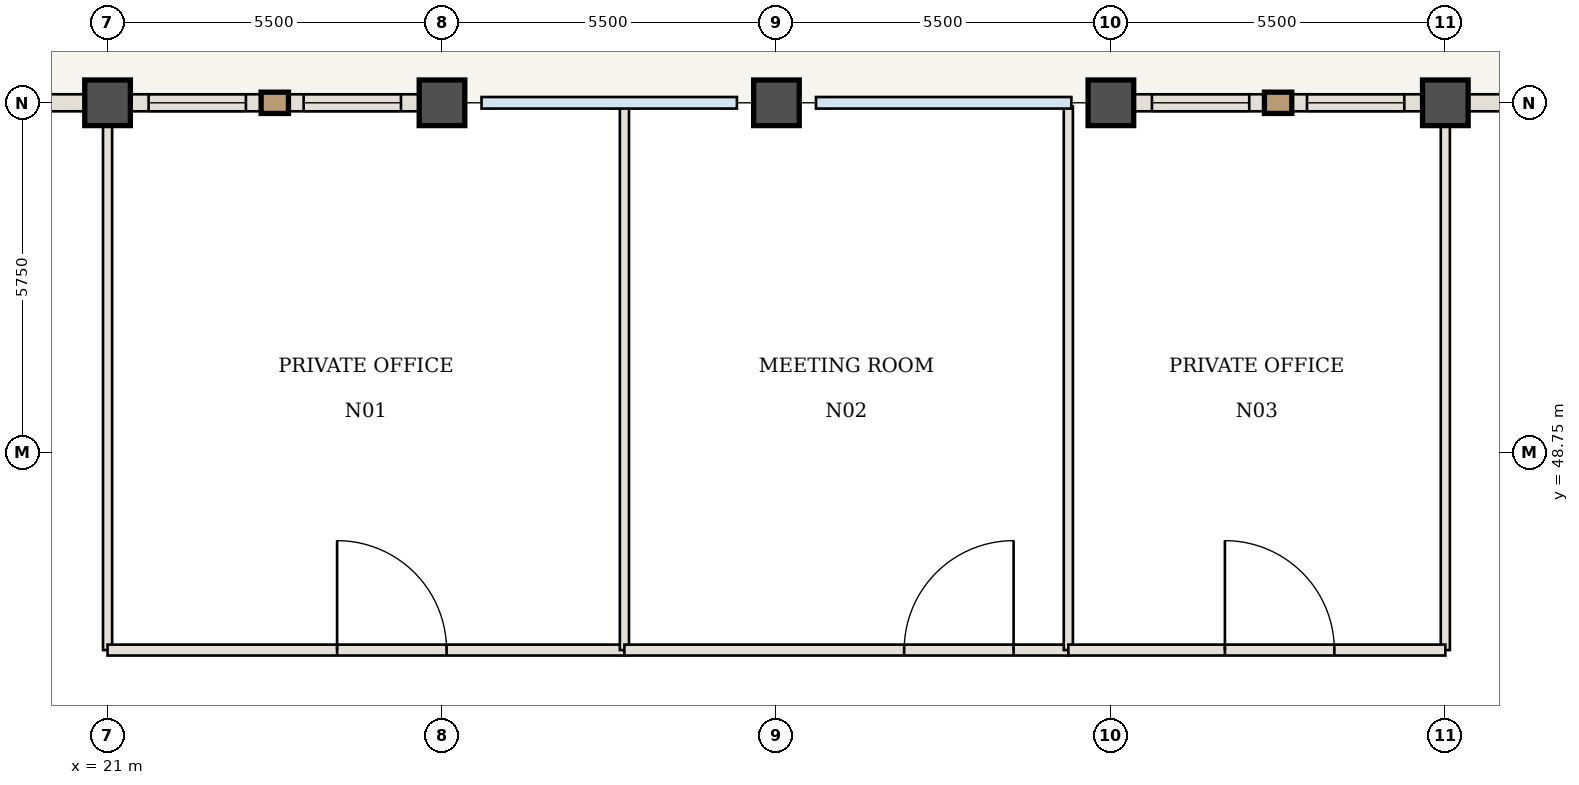
"""IFC4 building model, lengths in metres.
Left out: names, types, materials, properties, quantities, classifications, styles, units other than length and angle.
Written with IfcOpenShell. Run it as: python <this file> out.ifc"""

import sys

from ifc_helpers import new_model, si_unit, direction, frame, frame_2d, origin, origin_2d, place, context, subcontext, project, spatial, rectangle, extrude, element, fill, save


model = new_model("IFC4")
c1 = context("Model", 3, precision=1e-05, world=origin(), true_north=direction((0.0, 1.0)))
c2 = subcontext(c1, "Body", "Model", "MODEL_VIEW")
j1 = project(units=[si_unit("LENGTHUNIT", "METRE"), si_unit("PLANEANGLEUNIT", "RADIAN")], contexts=[c1])
p1 = place(None, origin())
s1 = spatial("IfcSite", under=j1, at=p1, CompositionType="ELEMENT")
p2 = place(p1, origin())
s2 = spatial("IfcBuilding", under=s1, at=p2, CompositionType="ELEMENT")
p3 = place(p2, frame((0.0, 0.0, 257.6)))
s3 = spatial("IfcBuildingStorey", under=s2, at=p3, CompositionType="ELEMENT", Elevation=257.6)
for number, where, z_axis, x_axis in (
    (1, (21.0, 54.5, -0.42), (0.0, 0.0, 1.0), (1.0, 0.0, 0.0)),
    (2, (26.5, 54.5, -0.42), (0.0, 0.0, 1.0), (1.0, 0.0, 0.0)),
    (3, (32.0, 54.5, -0.42), (0.0, 0.0, 1.0), (1.0, 0.0, 0.0)),
    (4, (37.5, 54.5, -0.42), (0.0, 0.0, 1.0), (1.0, 0.0, 0.0)),
    (5, (43.0, 54.5, -0.42), (0.0, 0.0, 1.0), (1.0, 0.0, 0.0)),
):
    element("IfcColumn", number, at=place(p3, frame(where, z_axis=z_axis, x_axis=x_axis)), inside=s3, PredefinedType="COLUMN", context=c2, shape_type="SweptSolid", body=[
        extrude(rectangle(XDim=0.75, YDim=0.75, at=origin_2d()), origin(), (0.0, 0.0, 1.0), 4.97),
    ])
for number, where, z_axis, x_axis in (
    (6, (21.0, 45.5, 0.0), (0.0, 0.0, 1.0), (0.0, 1.0, 0.0)),
    (7, (43.0, 45.5, 0.0), (0.0, 0.0, 1.0), (0.0, 1.0, 0.0)),
):
    element("IfcWall", number, at=place(p3, frame(where, z_axis=z_axis, x_axis=x_axis)), inside=s3, PredefinedType="STANDARD", context=c2, shape_type="SweptSolid", body=[
        extrude(rectangle(XDim=8.94, YDim=0.15, at=frame_2d((4.47, 0.0))), origin(), (0.0, 0.0, 1.0), 4.13),
    ])
p4 = place(p3, frame((21.0, 45.5, 0.0), z_axis=(0.0, 0.0, 1.0), x_axis=(1.0, 0.0, 0.0)))
e8 = element("IfcWall", 8, at=p4, inside=s3, PredefinedType="STANDARD", context=c2, shape_type="SweptSolid", body=[
    extrude(rectangle(XDim=8.5, YDim=0.18, at=frame_2d((4.25, 0.0))), origin(), (0.0, 0.0, 1.0), 4.13),
])
p5 = place(p4, frame((3.775, 0.0, 0.0)))
e9 = element("IfcOpeningElement", 9, at=p5, cuts=e8, PredefinedType="OPENING", context=c2, shape_type="SweptSolid", body=[
    extrude(rectangle(XDim=1.8, YDim=2.35, at=frame_2d((0.9, 1.175))), frame((0.0, 0.1, 0.0), z_axis=(0.0, -1.0, 0.0), x_axis=(1.0, 0.0, 0.0)), (0.0, 0.0, 1.0), 0.2),
])
p6 = place(p3, frame((29.5, 45.5, 0.0), z_axis=(0.0, 0.0, 1.0), x_axis=(0.0, 1.0, 0.0)))
e10 = element("IfcWall", 10, at=p6, inside=s3, PredefinedType="STANDARD", context=c2, shape_type="SweptSolid", body=[
    extrude(rectangle(XDim=8.94, YDim=0.15, at=frame_2d((4.47, 0.0))), origin(), (0.0, 0.0, 1.0), 4.13),
])
p7 = place(p3, frame((29.5, 45.5, 0.0), z_axis=(0.0, 0.0, 1.0), x_axis=(1.0, 0.0, 0.0)))
e11 = element("IfcWall", 11, at=p7, inside=s3, PredefinedType="STANDARD", context=c2, shape_type="SweptSolid", body=[
    extrude(rectangle(XDim=7.3, YDim=0.18, at=frame_2d((3.65, 0.0))), origin(), (0.0, 0.0, 1.0), 4.13),
])
p8 = place(p7, frame((4.6, 0.0, 0.0)))
e12 = element("IfcOpeningElement", 12, at=p8, cuts=e11, PredefinedType="OPENING", context=c2, shape_type="SweptSolid", body=[
    extrude(rectangle(XDim=1.8, YDim=2.35, at=frame_2d((0.9, 1.175))), frame((0.0, 0.1, 0.0), z_axis=(0.0, -1.0, 0.0), x_axis=(1.0, 0.0, 0.0)), (0.0, 0.0, 1.0), 0.2),
])
p9 = place(p3, frame((36.8, 45.5, 0.0), z_axis=(0.0, 0.0, 1.0), x_axis=(0.0, 1.0, 0.0)))
e13 = element("IfcWall", 13, at=p9, inside=s3, PredefinedType="STANDARD", context=c2, shape_type="SweptSolid", body=[
    extrude(rectangle(XDim=8.94, YDim=0.15, at=frame_2d((4.47, 0.0))), origin(), (0.0, 0.0, 1.0), 4.13),
])
p10 = place(p3, frame((36.8, 45.5, 0.0), z_axis=(0.0, 0.0, 1.0), x_axis=(1.0, 0.0, 0.0)))
e14 = element("IfcWall", 14, at=p10, inside=s3, PredefinedType="STANDARD", context=c2, shape_type="SweptSolid", body=[
    extrude(rectangle(XDim=6.2, YDim=0.18, at=frame_2d((3.1, 0.0))), origin(), (0.0, 0.0, 1.0), 4.13),
])
p11 = place(p10, frame((2.575, 0.0, 0.0)))
e15 = element("IfcOpeningElement", 15, at=p11, cuts=e14, PredefinedType="OPENING", context=c2, shape_type="SweptSolid", body=[
    extrude(rectangle(XDim=1.8, YDim=2.35, at=frame_2d((0.9, 1.175))), frame((0.0, 0.1, 0.0), z_axis=(0.0, -1.0, 0.0), x_axis=(1.0, 0.0, 0.0)), (0.0, 0.0, 1.0), 0.2),
])
p12 = place(p3, frame((15.5, 54.5, 0.0), z_axis=(0.0, 0.0, 1.0), x_axis=(1.0, 0.0, 0.0)))
e16 = element("IfcWall", 16, at=p12, inside=s3, PredefinedType="USERDEFINED", context=c2, shape_type="SweptSolid", body=[
    extrude(rectangle(XDim=5.5, YDim=0.28, at=frame_2d((2.75, 0.0))), origin(), (0.0, 0.0, 1.0), 3.43),
])
p13 = place(p3, frame((21.0, 54.5, 0.0), z_axis=(0.0, 0.0, 1.0), x_axis=(1.0, 0.0, 0.0)))
e17 = element("IfcWall", 17, at=p13, inside=s3, PredefinedType="USERDEFINED", context=c2, shape_type="SweptSolid", body=[
    extrude(rectangle(XDim=5.5, YDim=0.28, at=frame_2d((2.75, 0.0))), origin(), (0.0, 0.0, 1.0), 3.43),
])
p14 = place(p13, frame((0.675, 0.0, 0.85)))
e18 = element("IfcOpeningElement", 18, at=p14, cuts=e17, PredefinedType="OPENING", context=c2, shape_type="SweptSolid", body=[
    extrude(rectangle(XDim=1.6, YDim=2.15, at=frame_2d((0.8, 1.075))), frame((0.0, 0.15, 0.0), z_axis=(0.0, -1.0, 0.0), x_axis=(1.0, 0.0, 0.0)), (0.0, 0.0, 1.0), 0.3),
])
p15 = place(p13, frame((3.225, 0.0, 0.85)))
e19 = element("IfcOpeningElement", 19, at=p15, cuts=e17, PredefinedType="OPENING", context=c2, shape_type="SweptSolid", body=[
    extrude(rectangle(XDim=1.6, YDim=2.15, at=frame_2d((0.8, 1.075))), frame((0.0, 0.15, 0.0), z_axis=(0.0, -1.0, 0.0), x_axis=(1.0, 0.0, 0.0)), (0.0, 0.0, 1.0), 0.3),
])
p16 = place(p3, frame((37.5, 54.5, 0.0), z_axis=(0.0, 0.0, 1.0), x_axis=(1.0, 0.0, 0.0)))
e20 = element("IfcWall", 20, at=p16, inside=s3, PredefinedType="USERDEFINED", context=c2, shape_type="SweptSolid", body=[
    extrude(rectangle(XDim=5.5, YDim=0.28, at=frame_2d((2.75, 0.0))), origin(), (0.0, 0.0, 1.0), 3.43),
])
p17 = place(p16, frame((0.675, 0.0, 0.85)))
e21 = element("IfcOpeningElement", 21, at=p17, cuts=e20, PredefinedType="OPENING", context=c2, shape_type="SweptSolid", body=[
    extrude(rectangle(XDim=1.6, YDim=2.15, at=frame_2d((0.8, 1.075))), frame((0.0, 0.15, 0.0), z_axis=(0.0, -1.0, 0.0), x_axis=(1.0, 0.0, 0.0)), (0.0, 0.0, 1.0), 0.3),
])
p18 = place(p16, frame((3.225, 0.0, 0.85)))
e22 = element("IfcOpeningElement", 22, at=p18, cuts=e20, PredefinedType="OPENING", context=c2, shape_type="SweptSolid", body=[
    extrude(rectangle(XDim=1.6, YDim=2.15, at=frame_2d((0.8, 1.075))), frame((0.0, 0.15, 0.0), z_axis=(0.0, -1.0, 0.0), x_axis=(1.0, 0.0, 0.0)), (0.0, 0.0, 1.0), 0.3),
])
p19 = place(p3, frame((43.0, 54.5, 0.0), z_axis=(0.0, 0.0, 1.0), x_axis=(1.0, 0.0, 0.0)))
e23 = element("IfcWall", 23, at=p19, inside=s3, PredefinedType="USERDEFINED", context=c2, shape_type="SweptSolid", body=[
    extrude(rectangle(XDim=5.5, YDim=0.28, at=frame_2d((2.75, 0.0))), origin(), (0.0, 0.0, 1.0), 3.43),
])
p20 = place(p5, origin())
e24 = element("IfcDoor", 24, at=p20, inside=s3, OperationType="SINGLE_SWING_LEFT", PredefinedType="DOOR", context=c2, shape_type="SweptSolid", body=[
    extrude(rectangle(XDim=1.8, YDim=2.35, at=frame_2d((0.9, 1.175))), frame((0.0, 0.025, 0.0), z_axis=(0.0, -1.0, 0.0), x_axis=(1.0, 0.0, 0.0)), (0.0, 0.0, 1.0), 0.05),
])
fill(e9, e24)
p21 = place(p8, origin())
e25 = element("IfcDoor", 25, at=p21, inside=s3, OperationType="SINGLE_SWING_RIGHT", PredefinedType="DOOR", context=c2, shape_type="SweptSolid", body=[
    extrude(rectangle(XDim=1.8, YDim=2.35, at=frame_2d((0.9, 1.175))), frame((0.0, 0.025, 0.0), z_axis=(0.0, -1.0, 0.0), x_axis=(1.0, 0.0, 0.0)), (0.0, 0.0, 1.0), 0.05),
])
fill(e12, e25)
p22 = place(p11, origin())
e26 = element("IfcDoor", 26, at=p22, inside=s3, OperationType="SINGLE_SWING_LEFT", PredefinedType="DOOR", context=c2, shape_type="SweptSolid", body=[
    extrude(rectangle(XDim=1.8, YDim=2.35, at=frame_2d((0.9, 1.175))), frame((0.0, 0.025, 0.0), z_axis=(0.0, -1.0, 0.0), x_axis=(1.0, 0.0, 0.0)), (0.0, 0.0, 1.0), 0.05),
])
fill(e15, e26)
p23 = place(p14, origin())
e27 = element("IfcWindow", 27, at=p23, inside=s3, PartitioningType="SINGLE_PANEL", PredefinedType="WINDOW", context=c2, shape_type="SweptSolid", body=[
    extrude(rectangle(XDim=1.6, YDim=2.15, at=frame_2d((0.8, 1.075))), frame((0.0, 0.03, 0.0), z_axis=(0.0, -1.0, 0.0), x_axis=(1.0, 0.0, 0.0)), (0.0, 0.0, 1.0), 0.06),
])
fill(e18, e27)
p24 = place(p15, origin())
e28 = element("IfcWindow", 28, at=p24, inside=s3, PartitioningType="SINGLE_PANEL", PredefinedType="WINDOW", context=c2, shape_type="SweptSolid", body=[
    extrude(rectangle(XDim=1.6, YDim=2.15, at=frame_2d((0.8, 1.075))), frame((0.0, 0.03, 0.0), z_axis=(0.0, -1.0, 0.0), x_axis=(1.0, 0.0, 0.0)), (0.0, 0.0, 1.0), 0.06),
])
fill(e19, e28)
p25 = place(p17, origin())
e29 = element("IfcWindow", 29, at=p25, inside=s3, PartitioningType="SINGLE_PANEL", PredefinedType="WINDOW", context=c2, shape_type="SweptSolid", body=[
    extrude(rectangle(XDim=1.6, YDim=2.15, at=frame_2d((0.8, 1.075))), frame((0.0, 0.03, 0.0), z_axis=(0.0, -1.0, 0.0), x_axis=(1.0, 0.0, 0.0)), (0.0, 0.0, 1.0), 0.06),
])
fill(e21, e29)
p26 = place(p18, origin())
e30 = element("IfcWindow", 30, at=p26, inside=s3, PartitioningType="SINGLE_PANEL", PredefinedType="WINDOW", context=c2, shape_type="SweptSolid", body=[
    extrude(rectangle(XDim=1.6, YDim=2.15, at=frame_2d((0.8, 1.075))), frame((0.0, 0.03, 0.0), z_axis=(0.0, -1.0, 0.0), x_axis=(1.0, 0.0, 0.0)), (0.0, 0.0, 1.0), 0.06),
])
fill(e22, e30)
save(model, sys.argv[1])
